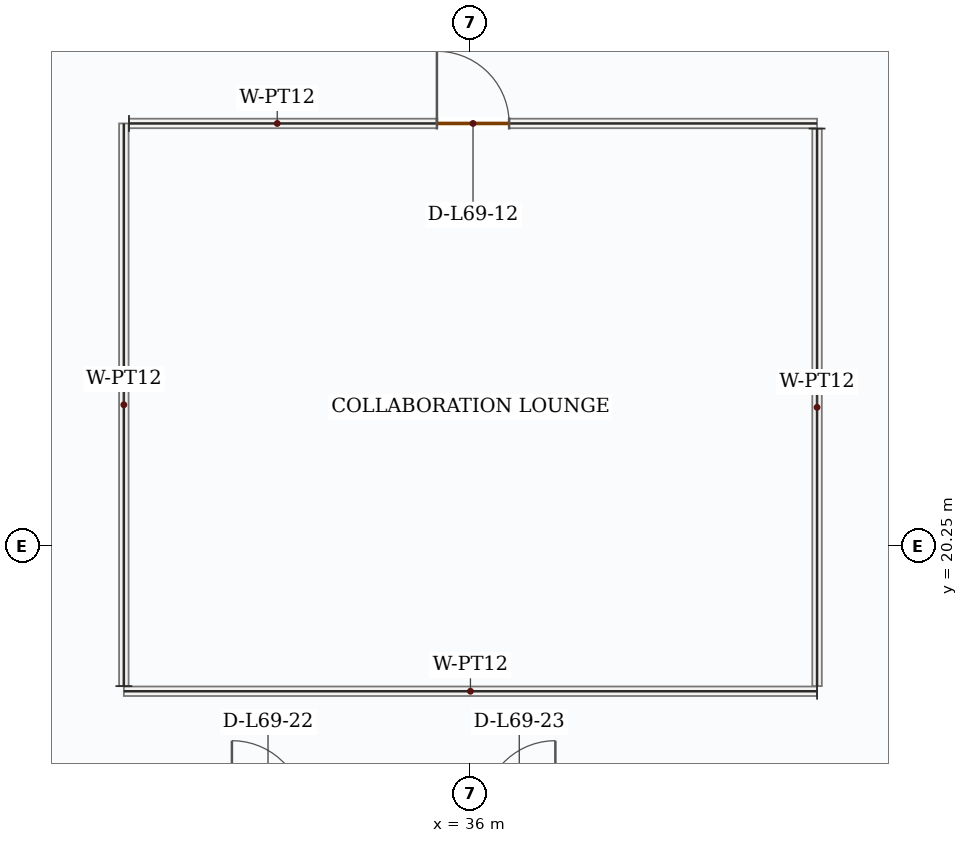
"""IFC4 building model, lengths in metres.
Left out: names, types, materials, properties, quantities, classifications, styles, units other than length and angle.
Written with IfcOpenShell. Run it as: python <this file> out.ifc"""

import sys

from ifc_helpers import new_model, si_unit, direction, frame, frame_2d, origin, place, context, subcontext, project, spatial, rectangle, extrude, source, transform, mapped, element, fill, save


model = new_model("IFC4")
c1 = context("Model", 3, precision=1e-05, world=origin(), true_north=direction((0.0, 1.0)))
c2 = subcontext(c1, "Body", "Model", "MODEL_VIEW")
j1 = project(units=[si_unit("LENGTHUNIT", "METRE"), si_unit("PLANEANGLEUNIT", "RADIAN")], contexts=[c1])
p1 = place(None, origin())
s1 = spatial("IfcSite", under=j1, at=p1, CompositionType="ELEMENT")
p2 = place(p1, origin())
s2 = spatial("IfcBuilding", under=s1, at=p2, CompositionType="ELEMENT")
p3 = place(p2, frame((0.0, 0.0, 287.85)))
s3 = spatial("IfcBuildingStorey", under=s2, at=p3, CompositionType="ELEMENT", Elevation=287.85)
m1 = source(origin(), c2, "Body", "SweptSolid", [
    extrude(rectangle(XDim=9.12, YDim=0.125, at=frame_2d((4.56, 0.0))), origin(), (0.0, 0.0, 1.0), 3.5),
])
p4 = place(p3, frame((40.56, 18.34, 0.0), z_axis=(0.0, 0.0, 1.0), x_axis=(-1.0, 0.0, 0.0)))
e1 = element("IfcWall", 1, at=p4, inside=s3, PredefinedType="PARTITIONING", context=c2, shape_type="MappedRepresentation", body=[
    mapped(m1, transform((0.0, 0.0, 0.0), x_axis=(1.0, 0.0, 0.0), y_axis=(0.0, 1.0, 0.0), z_axis=(0.0, 0.0, 1.0), scale=1.0)),
])
m2 = source(origin(), c2, "Body", "SweptSolid", [
    extrude(rectangle(XDim=7.403, YDim=0.125, at=frame_2d((3.701, 0.0))), origin(), (0.0, 0.0, 1.0), 3.5),
])
p5 = place(p3, frame((31.44, 18.407, 0.0), z_axis=(0.0, 0.0, 1.0), x_axis=(0.0, 1.0, 0.0)))
e2 = element("IfcWall", 2, at=p5, inside=s3, PredefinedType="PARTITIONING", context=c2, shape_type="MappedRepresentation", body=[
    mapped(m2, transform((0.0, 0.0, 0.0), x_axis=(1.0, 0.0, 0.0), y_axis=(0.0, 1.0, 0.0), z_axis=(0.0, 0.0, 1.0), scale=1.0)),
])
p6 = place(p3, frame((31.508, 25.81, 0.0), z_axis=(0.0, 0.0, 1.0), x_axis=(1.0, 0.0, 0.0)))
e3 = element("IfcWall", 3, at=p6, inside=s3, PredefinedType="PARTITIONING", context=c2, shape_type="SweptSolid", body=[
    extrude(rectangle(XDim=9.052, YDim=0.125, at=frame_2d((4.526, 0.0))), origin(), (0.0, 0.0, 1.0), 3.5),
])
p7 = place(p6, frame((4.051, 0.0, 0.0)))
e4 = element("IfcOpeningElement", 4, at=p7, cuts=e3, PredefinedType="OPENING", context=c2, shape_type="SweptSolid", body=[
    extrude(rectangle(XDim=0.95, YDim=2.15, at=frame_2d((0.475, 1.075))), frame((0.0, 0.073, 0.0), z_axis=(0.0, -1.0, 0.0), x_axis=(1.0, 0.0, 0.0)), (0.0, 0.0, 1.0), 0.145),
])
m3 = source(origin(), c2, "Body", "SweptSolid", [
    extrude(rectangle(XDim=7.335, YDim=0.125, at=frame_2d((3.667, 0.0))), origin(), (0.0, 0.0, 1.0), 3.5),
])
p8 = place(p3, frame((40.56, 25.742, 0.0), z_axis=(0.0, 0.0, 1.0), x_axis=(0.0, -1.0, 0.0)))
e5 = element("IfcWall", 5, at=p8, inside=s3, PredefinedType="PARTITIONING", context=c2, shape_type="MappedRepresentation", body=[
    mapped(m3, transform((0.0, 0.0, 0.0), x_axis=(1.0, 0.0, 0.0), y_axis=(0.0, 1.0, 0.0), z_axis=(0.0, 0.0, 1.0), scale=1.0)),
])
m4 = source(origin(), c2, "Body", "SweptSolid", [
    extrude(rectangle(XDim=0.95, YDim=2.15, at=frame_2d((0.475, 1.075))), frame((0.0, 0.025, 0.0), z_axis=(0.0, -1.0, 0.0), x_axis=(1.0, 0.0, 0.0)), (0.0, 0.0, 1.0), 0.05),
])
p9 = place(p7, origin())
e6 = element("IfcDoor", 6, at=p9, inside=s3, OperationType="SINGLE_SWING_LEFT", PredefinedType="DOOR", context=c2, shape_type="MappedRepresentation", body=[
    mapped(m4, transform((0.0, 0.0, 0.0), x_axis=(1.0, 0.0, 0.0), y_axis=(0.0, 1.0, 0.0), z_axis=(0.0, 0.0, 1.0), scale=1.0)),
])
fill(e4, e6)
save(model, sys.argv[1])
